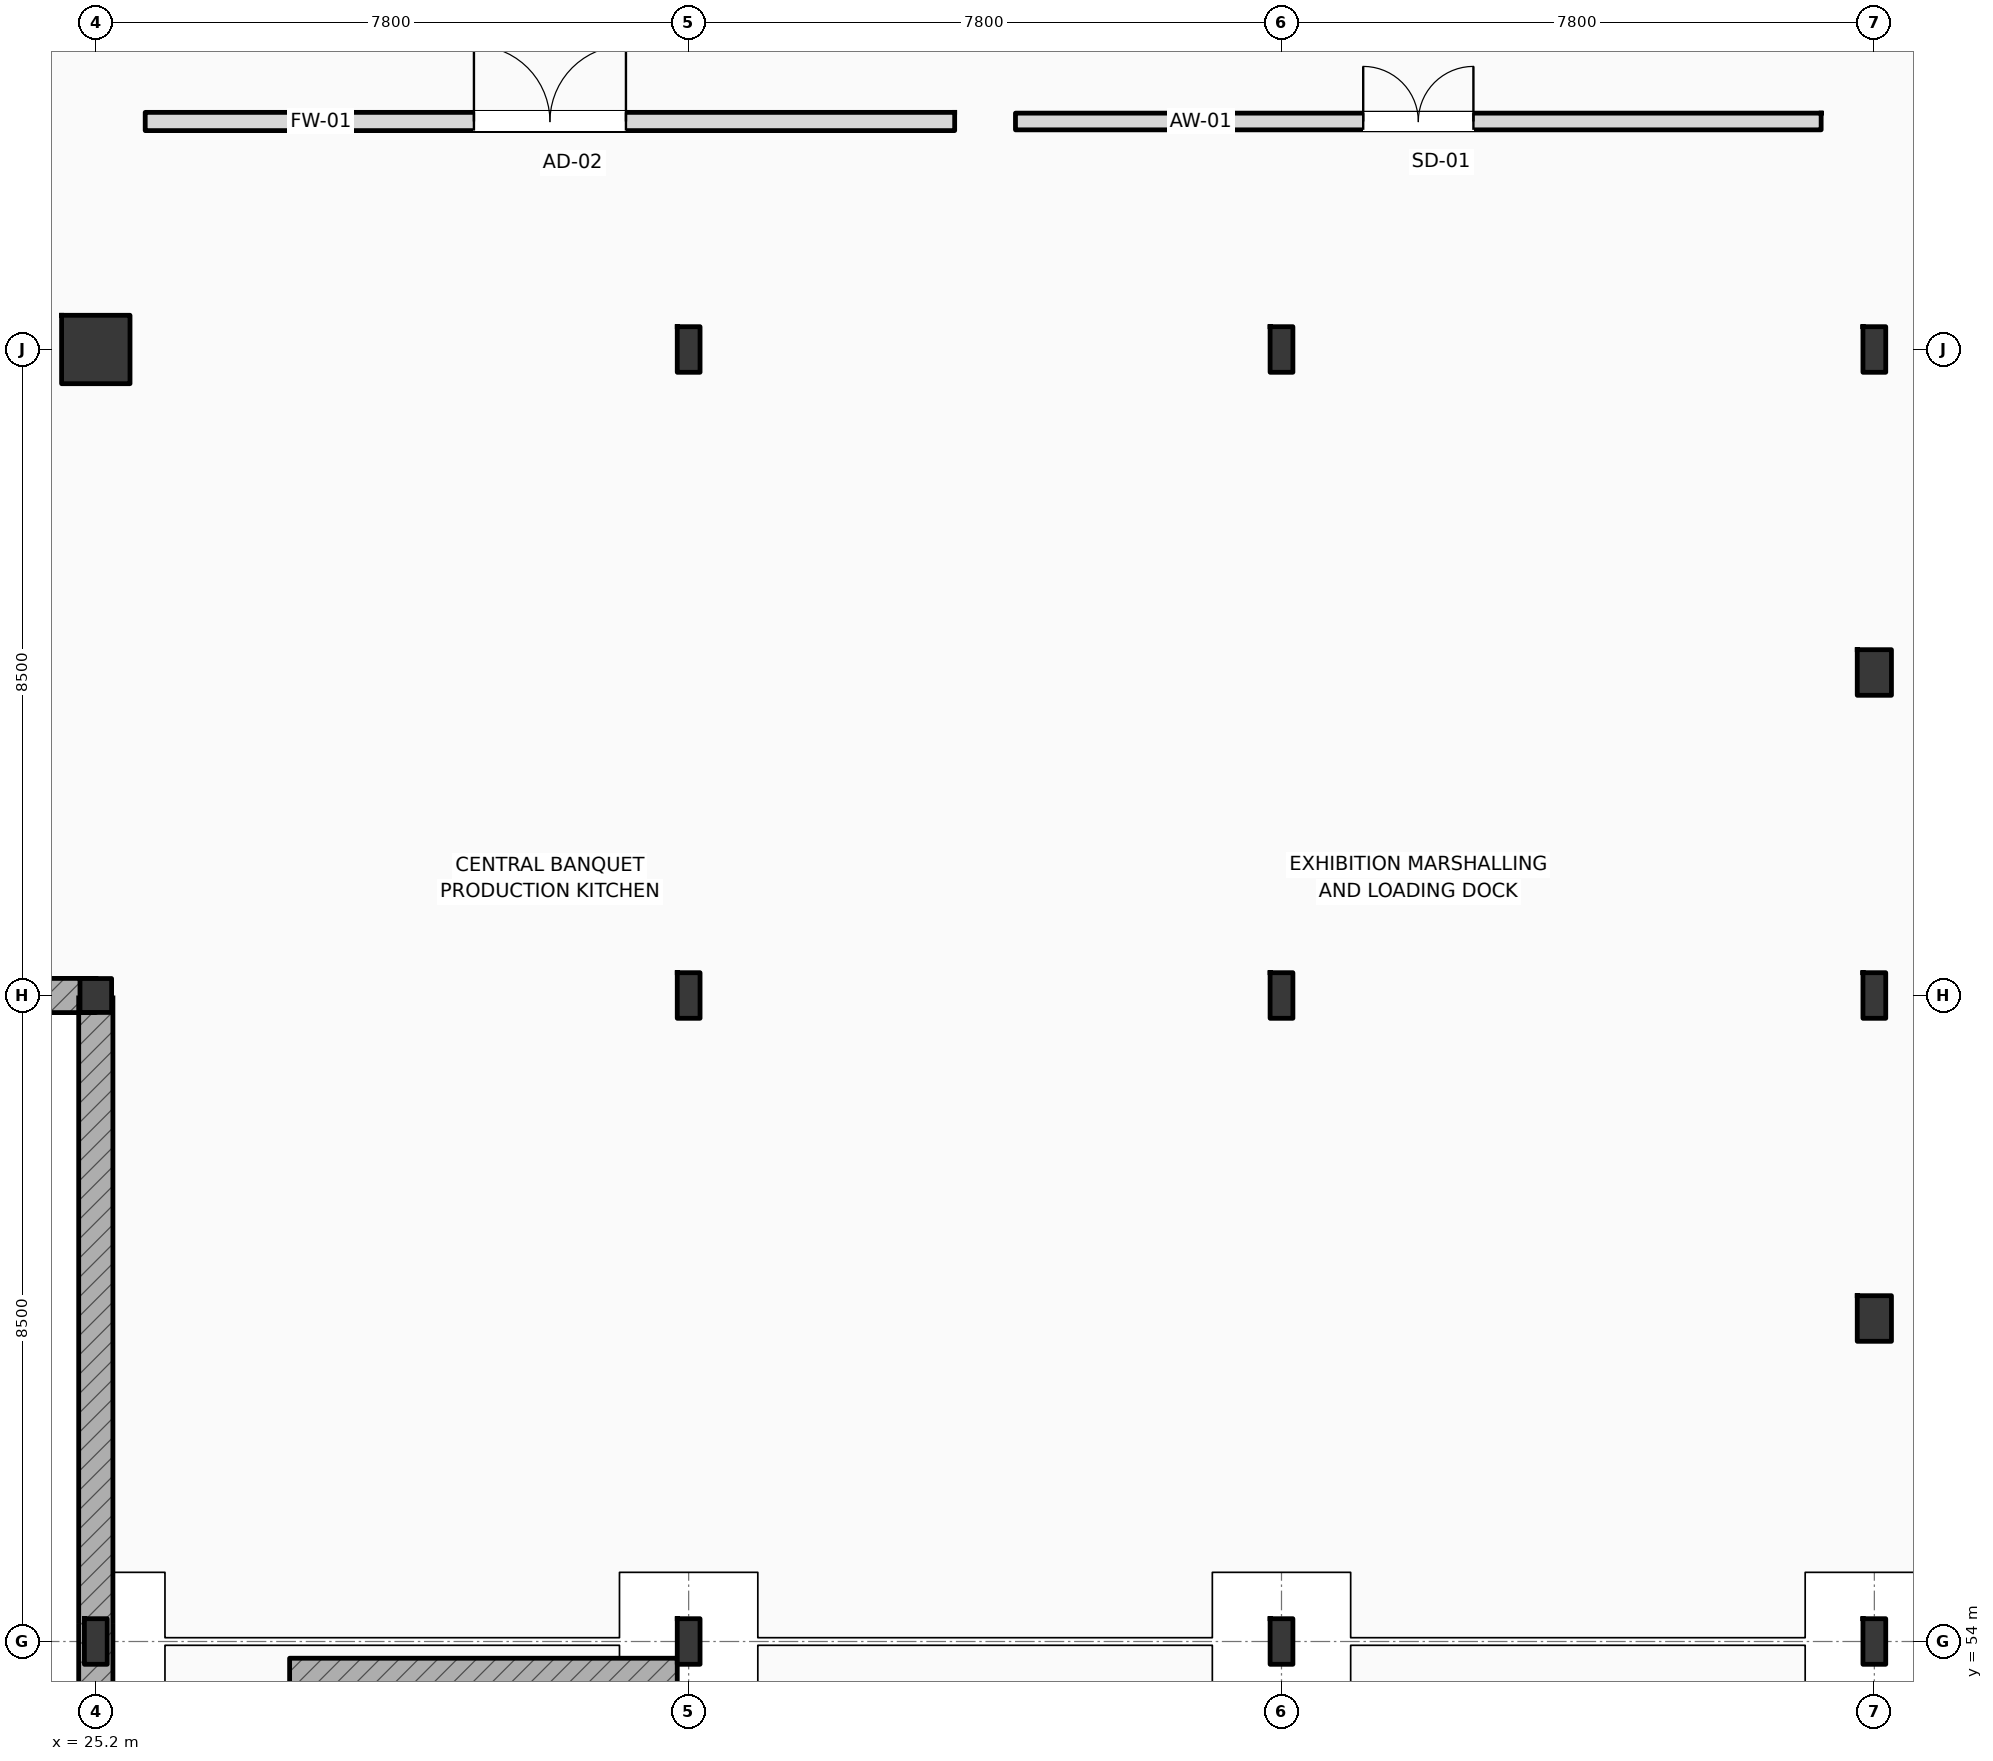
"""IFC4 building model, lengths in metres.
Left out: names, types, materials, properties, quantities, classifications, styles, units other than length and angle.
Written with IfcOpenShell. Run it as: python <this file> out.ifc"""

import sys

from ifc_helpers import new_model, si_unit, direction, frame, frame_2d, origin, origin_2d, place, context, subcontext, project, spatial, rectangle, i_section, extrude, element, fill, save


model = new_model("IFC4")
c1 = context("Model", 3, precision=1e-05, world=origin(), true_north=direction((0.0, 1.0)))
c2 = subcontext(c1, "Body", "Model", "MODEL_VIEW")
j1 = project(units=[si_unit("LENGTHUNIT", "METRE"), si_unit("PLANEANGLEUNIT", "RADIAN")], contexts=[c1])
p1 = place(None, origin())
s1 = spatial("IfcSite", under=j1, at=p1, CompositionType="ELEMENT")
p2 = place(p1, origin())
s2 = spatial("IfcBuilding", under=s1, at=p2, CompositionType="ELEMENT")
p3 = place(p2, frame((0.0, 0.0, -4.5)))
s3 = spatial("IfcBuildingStorey", under=s2, at=p3, CompositionType="ELEMENT", Elevation=-4.5)
p4 = place(p3, frame((0.0, 62.5, 0.0), z_axis=(0.0, 0.0, 1.0), x_axis=(1.0, 0.0, 0.0)))
e1 = element("IfcWall", 1, at=p4, inside=s3, PredefinedType="SOLIDWALL", context=c2, shape_type="SweptSolid", body=[
    extrude(rectangle(XDim=25.2, YDim=0.45, at=frame_2d((12.6, 0.0))), origin(), (0.0, 0.0, 1.0), 4.5),
])
p5 = place(p3, frame((25.2, 62.5, 0.0), z_axis=(0.0, 0.0, 1.0), x_axis=(0.0, -1.0, 0.0)))
e2 = element("IfcWall", 2, at=p5, inside=s3, PredefinedType="SOLIDWALL", context=c2, shape_type="SweptSolid", body=[
    extrude(rectangle(XDim=57.0, YDim=0.45, at=frame_2d((28.5, 0.0))), origin(), (0.0, 0.0, 1.0), 4.5),
])
p6 = place(p3, frame((25.2, 62.5, 0.0), z_axis=(0.0, 0.0, 1.0), x_axis=(1.0, 0.0, 0.0)))
e3 = element("IfcColumn", 3, at=p6, inside=s3, PredefinedType="COLUMN", context=c2, shape_type="SweptSolid", body=[
    extrude(i_section(OverallWidth=0.416, OverallDepth=0.446, WebThickness=0.036, FlangeThickness=0.048, FilletRadius=0.015, at=origin_2d()), origin(), (0.0, 0.0, 1.0), 4.5),
])
p7 = place(p3, frame((25.2, 71.0, 0.0), z_axis=(0.0, 0.0, 1.0), x_axis=(1.0, 0.0, 0.0)))
e4 = element("IfcColumn", 4, at=p7, inside=s3, PredefinedType="COLUMN", context=c2, shape_type="SweptSolid", body=[
    extrude(rectangle(XDim=0.9, YDim=0.9, at=origin_2d()), origin(), (0.0, 0.0, 1.0), 4.5),
])
for number, where, z_axis, x_axis in (
    (5, (25.2, 54.0, 0.0), (0.0, 0.0, 1.0), (1.0, 0.0, 0.0)),
    (6, (33.0, 54.0, 0.0), (0.0, 0.0, 1.0), (1.0, 0.0, 0.0)),
    (7, (33.0, 62.5, 0.0), (0.0, 0.0, 1.0), (1.0, 0.0, 0.0)),
    (8, (33.0, 71.0, 0.0), (0.0, 0.0, 1.0), (1.0, 0.0, 0.0)),
    (9, (40.8, 54.0, 0.0), (0.0, 0.0, 1.0), (1.0, 0.0, 0.0)),
    (10, (40.8, 62.5, 0.0), (0.0, 0.0, 1.0), (1.0, 0.0, 0.0)),
    (11, (40.8, 71.0, 0.0), (0.0, 0.0, 1.0), (1.0, 0.0, 0.0)),
    (12, (48.6, 54.0, 0.0), (0.0, 0.0, 1.0), (1.0, 0.0, 0.0)),
    (13, (48.6, 62.5, 0.0), (0.0, 0.0, 1.0), (1.0, 0.0, 0.0)),
    (14, (48.6, 71.0, 0.0), (0.0, 0.0, 1.0), (1.0, 0.0, 0.0)),
):
    element("IfcColumn", number, at=place(p3, frame(where, z_axis=z_axis, x_axis=x_axis)), inside=s3, PredefinedType="COLUMN", context=c2, shape_type="SweptSolid", body=[
        extrude(i_section(OverallWidth=0.3, OverallDepth=0.6, WebThickness=0.015, FlangeThickness=0.03, FilletRadius=0.027, at=origin_2d()), origin(), (0.0, 0.0, 1.0), 4.5),
    ])
for number, where, z_axis, x_axis in (
    (15, (48.6, 58.25, 0.0), (0.0, 0.0, 1.0), (1.0, 0.0, 0.0)),
    (16, (48.6, 66.75, 0.0), (0.0, 0.0, 1.0), (1.0, 0.0, 0.0)),
):
    element("IfcColumn", number, at=place(p3, frame(where, z_axis=z_axis, x_axis=x_axis)), inside=s3, PredefinedType="PILASTER", context=c2, shape_type="SweptSolid", body=[
        extrude(rectangle(XDim=0.45, YDim=0.6, at=origin_2d()), origin(), (0.0, 0.0, 1.0), 4.5),
    ])
p8 = place(p3, frame((27.75, 53.605, 0.0), z_axis=(0.0, 0.0, 1.0), x_axis=(1.0, 0.0, 0.0)))
e17 = element("IfcWall", 17, at=p8, inside=s3, PredefinedType="SHEAR", context=c2, shape_type="SweptSolid", body=[
    extrude(rectangle(XDim=5.1, YDim=0.35, at=frame_2d((2.55, 0.0))), origin(), (0.0, 0.0, 1.0), 4.5),
])
p9 = place(p3, frame((25.85, 74.0, 0.0), z_axis=(0.0, 0.0, 1.0), x_axis=(1.0, 0.0, 0.0)))
e18 = element("IfcWall", 18, at=p9, inside=s3, PredefinedType="STANDARD", context=c2, shape_type="SweptSolid", body=[
    extrude(rectangle(XDim=10.65, YDim=0.24, at=frame_2d((5.325, 0.0))), origin(), (0.0, 0.0, 1.0), 4.1),
])
p10 = place(p9, frame((4.325, 0.0, 0.0)))
e19 = element("IfcOpeningElement", 19, at=p10, cuts=e18, PredefinedType="OPENING", context=c2, shape_type="SweptSolid", body=[
    extrude(rectangle(XDim=2.0, YDim=2.35, at=frame_2d((1.0, 1.175))), frame((0.0, 0.13, 0.0), z_axis=(0.0, -1.0, 0.0), x_axis=(1.0, 0.0, 0.0)), (0.0, 0.0, 1.0), 0.26),
])
p11 = place(p3, frame((37.3, 74.0, 0.0), z_axis=(0.0, 0.0, 1.0), x_axis=(1.0, 0.0, 0.0)))
e20 = element("IfcWall", 20, at=p11, inside=s3, PredefinedType="PARTITIONING", context=c2, shape_type="SweptSolid", body=[
    extrude(rectangle(XDim=10.6, YDim=0.22, at=frame_2d((5.3, 0.0))), origin(), (0.0, 0.0, 1.0), 4.1),
])
p12 = place(p11, frame((4.575, 0.0, 0.0)))
e21 = element("IfcOpeningElement", 21, at=p12, cuts=e20, PredefinedType="OPENING", context=c2, shape_type="SweptSolid", body=[
    extrude(rectangle(XDim=1.45, YDim=2.2, at=frame_2d((0.725, 1.1))), frame((0.0, 0.12, 0.0), z_axis=(0.0, -1.0, 0.0), x_axis=(1.0, 0.0, 0.0)), (0.0, 0.0, 1.0), 0.24),
])
p13 = place(p10, origin())
e22 = element("IfcDoor", 22, at=p13, inside=s3, OperationType="DOUBLE_SWING_LEFT", PredefinedType="DOOR", context=c2, shape_type="SweptSolid", body=[
    extrude(rectangle(XDim=2.0, YDim=2.35, at=frame_2d((1.0, 1.175))), frame((0.0, 0.025, 0.0), z_axis=(0.0, -1.0, 0.0), x_axis=(1.0, 0.0, 0.0)), (0.0, 0.0, 1.0), 0.05),
])
fill(e19, e22)
p14 = place(p12, origin())
e23 = element("IfcDoor", 23, at=p14, inside=s3, OperationType="DOUBLE_SWING_LEFT", PredefinedType="DOOR", context=c2, shape_type="SweptSolid", body=[
    extrude(rectangle(XDim=1.45, YDim=2.2, at=frame_2d((0.725, 1.1))), frame((0.0, 0.025, 0.0), z_axis=(0.0, -1.0, 0.0), x_axis=(1.0, 0.0, 0.0)), (0.0, 0.0, 1.0), 0.05),
])
fill(e21, e23)
save(model, sys.argv[1])
